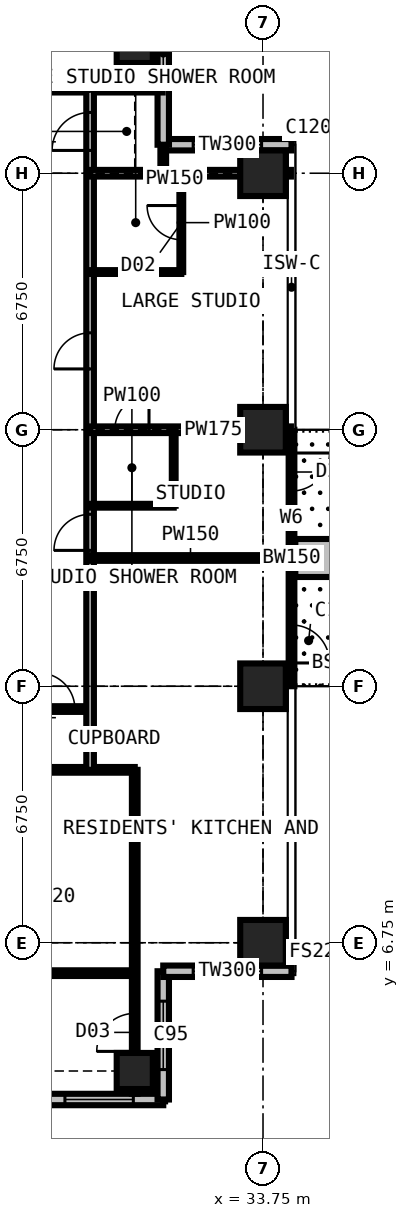
"""IFC4 building model, lengths in metres.
Left out: names, types, materials, properties, quantities, classifications, styles, units other than length and angle.
Written with IfcOpenShell. Run it as: python <this file> out.ifc"""

import sys

from ifc_helpers import new_model, si_unit, direction, frame, frame_2d, origin, origin_2d, place, context, subcontext, project, spatial, rectangle, extrude, element, fill, save


model = new_model("IFC4")
c1 = context("Model", 3, precision=1e-05, world=origin(), true_north=direction((0.0, 1.0)))
c2 = subcontext(c1, "Body", "Model", "MODEL_VIEW")
j1 = project(units=[si_unit("LENGTHUNIT", "METRE"), si_unit("PLANEANGLEUNIT", "RADIAN")], contexts=[c1])
p1 = place(None, origin())
s1 = spatial("IfcSite", under=j1, at=p1, CompositionType="ELEMENT")
p2 = place(p1, origin())
s2 = spatial("IfcBuilding", under=s1, at=p2, CompositionType="ELEMENT")
p3 = place(p2, frame((0.0, 0.0, 178.2)))
s3 = spatial("IfcBuildingStorey", under=s2, at=p3, CompositionType="ELEMENT", Elevation=178.2)
for number, where, z_axis, x_axis in (
    (1, (30.375, 3.375, 0.0), (0.0, 0.0, 1.0), (1.0, 0.0, 0.0)),
    (2, (30.375, 30.375, 0.0), (0.0, 0.0, 1.0), (1.0, 0.0, 0.0)),
):
    element("IfcColumn", number, at=place(p3, frame(where, z_axis=z_axis, x_axis=x_axis)), inside=s3, PredefinedType="COLUMN", context=c2, shape_type="SweptSolid", body=[
        extrude(rectangle(XDim=0.95, YDim=0.95, at=origin_2d()), origin(), (0.0, 0.0, 1.0), 3.6),
    ])
for number, where, z_axis, x_axis in (
    (3, (33.75, 6.75, 0.0), (0.0, 0.0, 1.0), (1.0, 0.0, 0.0)),
    (4, (33.75, 13.5, 0.0), (0.0, 0.0, 1.0), (1.0, 0.0, 0.0)),
    (5, (33.75, 20.25, 0.0), (0.0, 0.0, 1.0), (1.0, 0.0, 0.0)),
    (6, (33.75, 27.0, 0.0), (0.0, 0.0, 1.0), (1.0, 0.0, 0.0)),
):
    element("IfcColumn", number, at=place(p3, frame(where, z_axis=z_axis, x_axis=x_axis)), inside=s3, PredefinedType="COLUMN", context=c2, shape_type="SweptSolid", body=[
        extrude(rectangle(XDim=1.2, YDim=1.2, at=origin_2d()), origin(), (0.0, 0.0, 1.0), 3.6),
    ])
p4 = place(p3, frame((34.5, 20.25, 0.0), z_axis=(0.0, 0.0, 1.0), x_axis=(0.0, -1.0, 0.0)))
e7 = element("IfcWall", 7, at=p4, inside=s3, PredefinedType="SOLIDWALL", context=c2, shape_type="SweptSolid", body=[
    extrude(rectangle(XDim=6.75, YDim=0.15, at=frame_2d((3.375, 0.0))), origin(), (0.0, 0.0, 1.0), 3.375),
])
p5 = place(p4, frame((0.613, 0.0, 0.0)))
e8 = element("IfcOpeningElement", 8, at=p5, cuts=e7, PredefinedType="OPENING", context=c2, shape_type="SweptSolid", body=[
    extrude(rectangle(XDim=1.0, YDim=2.2, at=frame_2d((0.5, 1.1))), frame((0.0, 0.085, 0.0), z_axis=(0.0, -1.0, 0.0), x_axis=(1.0, 0.0, 0.0)), (0.0, 0.0, 1.0), 0.17),
])
p6 = place(p4, frame((1.725, 0.0, 0.9)))
e9 = element("IfcOpeningElement", 9, at=p6, cuts=e7, PredefinedType="OPENING", context=c2, shape_type="SweptSolid", body=[
    extrude(rectangle(XDim=1.2, YDim=1.8, at=frame_2d((0.6, 0.9))), frame((0.0, 0.085, 0.0), z_axis=(0.0, -1.0, 0.0), x_axis=(1.0, 0.0, 0.0)), (0.0, 0.0, 1.0), 0.17),
])
p7 = place(p4, frame((5.137, 0.0, 0.0)))
e10 = element("IfcOpeningElement", 10, at=p7, cuts=e7, PredefinedType="OPENING", context=c2, shape_type="SweptSolid", body=[
    extrude(rectangle(XDim=1.0, YDim=2.2, at=frame_2d((0.5, 1.1))), frame((0.0, 0.085, 0.0), z_axis=(0.0, -1.0, 0.0), x_axis=(1.0, 0.0, 0.0)), (0.0, 0.0, 1.0), 0.17),
])
p8 = place(p4, frame((3.825, 0.0, 0.9)))
e11 = element("IfcOpeningElement", 11, at=p8, cuts=e7, PredefinedType="OPENING", context=c2, shape_type="SweptSolid", body=[
    extrude(rectangle(XDim=1.2, YDim=1.8, at=frame_2d((0.6, 0.9))), frame((0.0, 0.085, 0.0), z_axis=(0.0, -1.0, 0.0), x_axis=(1.0, 0.0, 0.0)), (0.0, 0.0, 1.0), 0.17),
])
p9 = place(p3, frame((34.5, 27.75, 0.0), z_axis=(0.0, 0.0, 1.0), x_axis=(-1.0, 0.0, 0.0)))
e12 = element("IfcWall", 12, at=p9, inside=s3, PredefinedType="SOLIDWALL", context=c2, shape_type="SweptSolid", body=[
    extrude(rectangle(XDim=3.375, YDim=0.3, at=frame_2d((1.688, 0.0))), origin(), (0.0, 0.0, 1.0), 3.375),
])
p10 = place(p9, frame((0.788, 0.0, 0.6)))
e13 = element("IfcOpeningElement", 13, at=p10, cuts=e12, PredefinedType="OPENING", context=c2, shape_type="SweptSolid", body=[
    extrude(rectangle(XDim=1.8, YDim=2.1, at=frame_2d((0.9, 1.05))), frame((0.0, 0.16, 0.0), z_axis=(0.0, -1.0, 0.0), x_axis=(1.0, 0.0, 0.0)), (0.0, 0.0, 1.0), 0.32),
])
p11 = place(p3, frame((31.125, 27.75, 0.0), z_axis=(0.0, 0.0, 1.0), x_axis=(0.0, 1.0, 0.0)))
e14 = element("IfcWall", 14, at=p11, inside=s3, PredefinedType="SOLIDWALL", context=c2, shape_type="SweptSolid", body=[
    extrude(rectangle(XDim=3.375, YDim=0.3, at=frame_2d((1.688, 0.0))), origin(), (0.0, 0.0, 1.0), 3.375),
])
p12 = place(p11, frame((1.663, 0.0, 0.9)))
e15 = element("IfcOpeningElement", 15, at=p12, cuts=e14, PredefinedType="OPENING", context=c2, shape_type="SweptSolid", body=[
    extrude(rectangle(XDim=1.5, YDim=1.8, at=frame_2d((0.75, 0.9))), frame((0.0, 0.16, 0.0), z_axis=(0.0, -1.0, 0.0), x_axis=(1.0, 0.0, 0.0)), (0.0, 0.0, 1.0), 0.32),
])
p13 = place(p3, frame((27.75, 2.625, 0.0), z_axis=(0.0, 0.0, 1.0), x_axis=(1.0, 0.0, 0.0)))
e16 = element("IfcWall", 16, at=p13, inside=s3, PredefinedType="SOLIDWALL", context=c2, shape_type="SweptSolid", body=[
    extrude(rectangle(XDim=3.375, YDim=0.3, at=frame_2d((1.688, 0.0))), origin(), (0.0, 0.0, 1.0), 3.375),
])
p14 = place(p13, frame((0.788, 0.0, 0.6)))
e17 = element("IfcOpeningElement", 17, at=p14, cuts=e16, PredefinedType="OPENING", context=c2, shape_type="SweptSolid", body=[
    extrude(rectangle(XDim=1.8, YDim=2.1, at=frame_2d((0.9, 1.05))), frame((0.0, 0.16, 0.0), z_axis=(0.0, -1.0, 0.0), x_axis=(1.0, 0.0, 0.0)), (0.0, 0.0, 1.0), 0.32),
])
p15 = place(p3, frame((31.125, 2.625, 0.0), z_axis=(0.0, 0.0, 1.0), x_axis=(0.0, 1.0, 0.0)))
e18 = element("IfcWall", 18, at=p15, inside=s3, PredefinedType="SOLIDWALL", context=c2, shape_type="SweptSolid", body=[
    extrude(rectangle(XDim=3.375, YDim=0.3, at=frame_2d((1.688, 0.0))), origin(), (0.0, 0.0, 1.0), 3.375),
])
p16 = place(p15, frame((0.788, 0.0, 0.6)))
e19 = element("IfcOpeningElement", 19, at=p16, cuts=e18, PredefinedType="OPENING", context=c2, shape_type="SweptSolid", body=[
    extrude(rectangle(XDim=1.8, YDim=2.1, at=frame_2d((0.9, 1.05))), frame((0.0, 0.16, 0.0), z_axis=(0.0, -1.0, 0.0), x_axis=(1.0, 0.0, 0.0)), (0.0, 0.0, 1.0), 0.32),
])
p17 = place(p3, frame((31.125, 6.0, 0.0), z_axis=(0.0, 0.0, 1.0), x_axis=(1.0, 0.0, 0.0)))
e20 = element("IfcWall", 20, at=p17, inside=s3, PredefinedType="SOLIDWALL", context=c2, shape_type="SweptSolid", body=[
    extrude(rectangle(XDim=3.375, YDim=0.3, at=frame_2d((1.688, 0.0))), origin(), (0.0, 0.0, 1.0), 3.375),
])
p18 = place(p17, frame((0.788, 0.0, 0.6)))
e21 = element("IfcOpeningElement", 21, at=p18, cuts=e20, PredefinedType="OPENING", context=c2, shape_type="SweptSolid", body=[
    extrude(rectangle(XDim=1.8, YDim=2.1, at=frame_2d((0.9, 1.05))), frame((0.0, 0.16, 0.0), z_axis=(0.0, -1.0, 0.0), x_axis=(1.0, 0.0, 0.0)), (0.0, 0.0, 1.0), 0.32),
])
p19 = place(p3, frame((34.6, 16.875, 0.0), z_axis=(0.0, 0.0, 1.0), x_axis=(1.0, 0.0, 0.0)))
e22 = element("IfcWall", 22, at=p19, inside=s3, PredefinedType="USERDEFINED", context=c2, shape_type="SweptSolid", body=[
    extrude(rectangle(XDim=2.2, YDim=1.0, at=frame_2d((1.1, 0.0))), origin(), (0.0, 0.0, 1.0), 0.9),
])
p20 = place(p3, frame((10.125, 11.3, 0.0), z_axis=(0.0, 0.0, 1.0), x_axis=(1.0, 0.0, 0.0)))
e23 = element("IfcWall", 23, at=p20, inside=s3, PredefinedType="PARTITIONING", context=c2, shape_type="SweptSolid", body=[
    extrude(rectangle(XDim=20.25, YDim=0.15, at=frame_2d((10.125, 0.0))), origin(), (0.0, 0.0, 1.0), 3.375),
])
p21 = place(p20, frame((5.2, 0.0, 0.0)))
e24 = element("IfcOpeningElement", 24, at=p21, cuts=e23, PredefinedType="OPENING", context=c2, shape_type="SweptSolid", body=[
    extrude(rectangle(XDim=1.0, YDim=2.2, at=frame_2d((0.5, 1.1))), frame((0.0, 0.085, 0.0), z_axis=(0.0, -1.0, 0.0), x_axis=(1.0, 0.0, 0.0)), (0.0, 0.0, 1.0), 0.17),
])
p22 = place(p20, frame((11.312, 0.0, 0.0)))
e25 = element("IfcOpeningElement", 25, at=p22, cuts=e23, PredefinedType="OPENING", context=c2, shape_type="SweptSolid", body=[
    extrude(rectangle(XDim=1.0, YDim=2.2, at=frame_2d((0.5, 1.1))), frame((0.0, 0.085, 0.0), z_axis=(0.0, -1.0, 0.0), x_axis=(1.0, 0.0, 0.0)), (0.0, 0.0, 1.0), 0.17),
])
p23 = place(p20, frame((2.425, 0.0, 0.0)))
e26 = element("IfcOpeningElement", 26, at=p23, cuts=e23, PredefinedType="OPENING", context=c2, shape_type="SweptSolid", body=[
    extrude(rectangle(XDim=0.95, YDim=2.2, at=frame_2d((0.475, 1.1))), frame((0.0, 0.085, 0.0), z_axis=(0.0, -1.0, 0.0), x_axis=(1.0, 0.0, 0.0)), (0.0, 0.0, 1.0), 0.17),
])
p24 = place(p3, frame((11.3, 29.2, 0.0), z_axis=(0.0, 0.0, 1.0), x_axis=(1.0, 0.0, 0.0)))
e27 = element("IfcWall", 27, at=p24, inside=s3, PredefinedType="PARTITIONING", context=c2, shape_type="SweptSolid", body=[
    extrude(rectangle(XDim=19.809, YDim=0.15, at=frame_2d((9.904, 0.0))), origin(), (0.0, 0.0, 1.0), 3.375),
])
p25 = place(p24, frame((12.9, 0.0, 0.0)))
e28 = element("IfcOpeningElement", 28, at=p25, cuts=e27, PredefinedType="OPENING", context=c2, shape_type="SweptSolid", body=[
    extrude(rectangle(XDim=1.0, YDim=2.2, at=frame_2d((0.5, 1.1))), frame((0.0, 0.085, 0.0), z_axis=(0.0, -1.0, 0.0), x_axis=(1.0, 0.0, 0.0)), (0.0, 0.0, 1.0), 0.17),
])
p26 = place(p24, frame((5.825, 0.0, 0.0)))
e29 = element("IfcOpeningElement", 29, at=p26, cuts=e27, PredefinedType="OPENING", context=c2, shape_type="SweptSolid", body=[
    extrude(rectangle(XDim=0.95, YDim=2.2, at=frame_2d((0.475, 1.1))), frame((0.0, 0.085, 0.0), z_axis=(0.0, -1.0, 0.0), x_axis=(1.0, 0.0, 0.0)), (0.0, 0.0, 1.0), 0.17),
])
p27 = place(p24, frame((0.6, 0.0, 0.0)))
e30 = element("IfcOpeningElement", 30, at=p27, cuts=e27, PredefinedType="OPENING", context=c2, shape_type="SweptSolid", body=[
    extrude(rectangle(XDim=1.0, YDim=2.2, at=frame_2d((0.5, 1.1))), frame((0.0, 0.085, 0.0), z_axis=(0.0, -1.0, 0.0), x_axis=(1.0, 0.0, 0.0)), (0.0, 0.0, 1.0), 0.17),
])
p28 = place(p3, frame((27.4, 12.9, 0.0), z_axis=(0.0, 0.0, 1.0), x_axis=(1.0, 0.0, 0.0)))
e31 = element("IfcWall", 31, at=p28, inside=s3, PredefinedType="PARTITIONING", context=c2, shape_type="SweptSolid", body=[
    extrude(rectangle(XDim=1.8, YDim=0.15, at=frame_2d((0.9, 0.0))), origin(), (0.0, 0.0, 1.0), 2.806),
])
p29 = place(p28, frame((0.45, 0.0, 0.0)))
e32 = element("IfcOpeningElement", 32, at=p29, cuts=e31, PredefinedType="OPENING", context=c2, shape_type="SweptSolid", body=[
    extrude(rectangle(XDim=0.95, YDim=2.2, at=frame_2d((0.475, 1.1))), frame((0.0, 0.085, 0.0), z_axis=(0.0, -1.0, 0.0), x_axis=(1.0, 0.0, 0.0)), (0.0, 0.0, 1.0), 0.17),
])
p30 = place(p3, frame((27.725, 5.95, 0.0), z_axis=(0.0, 0.0, 1.0), x_axis=(1.0, 0.0, 0.0)))
e33 = element("IfcWall", 33, at=p30, inside=s3, PredefinedType="PARTITIONING", context=c2, shape_type="SweptSolid", body=[
    extrude(rectangle(XDim=2.65, YDim=0.15, at=frame_2d((1.325, 0.0))), origin(), (0.0, 0.0, 1.0), 3.375),
])
p31 = place(p3, frame((29.2, 11.3, 0.0), z_axis=(0.0, 0.0, 1.0), x_axis=(0.0, 1.0, 0.0)))
e34 = element("IfcWall", 34, at=p31, inside=s3, PredefinedType="PARTITIONING", context=c2, shape_type="SweptSolid", body=[
    extrude(rectangle(XDim=17.9, YDim=0.2, at=frame_2d((8.95, 0.0))), origin(), (0.0, 0.0, 1.0), 3.375),
])
p32 = place(p31, frame((10.55, 0.0, 0.0)))
e35 = element("IfcOpeningElement", 35, at=p32, cuts=e34, PredefinedType="OPENING", context=c2, shape_type="SweptSolid", body=[
    extrude(rectangle(XDim=0.95, YDim=2.2, at=frame_2d((0.475, 1.1))), frame((0.0, 0.11, 0.0), z_axis=(0.0, -1.0, 0.0), x_axis=(1.0, 0.0, 0.0)), (0.0, 0.0, 1.0), 0.22),
])
p33 = place(p31, frame((5.775, 0.0, 0.0)))
e36 = element("IfcOpeningElement", 36, at=p33, cuts=e34, PredefinedType="OPENING", context=c2, shape_type="SweptSolid", body=[
    extrude(rectangle(XDim=0.95, YDim=2.2, at=frame_2d((0.475, 1.1))), frame((0.0, 0.11, 0.0), z_axis=(0.0, -1.0, 0.0), x_axis=(1.0, 0.0, 0.0)), (0.0, 0.0, 1.0), 0.22),
])
p34 = place(p31, frame((16.3, 0.0, 0.0)))
e37 = element("IfcOpeningElement", 37, at=p34, cuts=e34, PredefinedType="OPENING", context=c2, shape_type="SweptSolid", body=[
    extrude(rectangle(XDim=1.0, YDim=2.2, at=frame_2d((0.5, 1.1))), frame((0.0, 0.11, 0.0), z_axis=(0.0, -1.0, 0.0), x_axis=(1.0, 0.0, 0.0)), (0.0, 0.0, 1.0), 0.22),
])
p35 = place(p3, frame((29.2, 16.875, 0.0), z_axis=(0.0, 0.0, 1.0), x_axis=(1.0, 0.0, 0.0)))
e38 = element("IfcWall", 38, at=p35, inside=s3, PredefinedType="PARTITIONING", context=c2, shape_type="SweptSolid", body=[
    extrude(rectangle(XDim=5.284, YDim=0.15, at=frame_2d((2.642, 0.0))), origin(), (0.0, 0.0, 1.0), 3.375),
])
p36 = place(p3, frame((29.2, 18.25, 0.0), z_axis=(0.0, 0.0, 1.0), x_axis=(1.0, 0.0, 0.0)))
e39 = element("IfcWall", 39, at=p36, inside=s3, PredefinedType="PARTITIONING", context=c2, shape_type="SweptSolid", body=[
    extrude(rectangle(XDim=2.2, YDim=0.1, at=frame_2d((1.1, 0.0))), origin(), (0.0, 0.0, 1.0), 3.375),
])
p37 = place(p3, frame((29.2, 20.25, 0.0), z_axis=(0.0, 0.0, 1.0), x_axis=(1.0, 0.0, 0.0)))
e40 = element("IfcWall", 40, at=p37, inside=s3, PredefinedType="PARTITIONING", context=c2, shape_type="SweptSolid", body=[
    extrude(rectangle(XDim=5.284, YDim=0.175, at=frame_2d((2.642, 0.0))), origin(), (0.0, 0.0, 1.0), 2.806),
])
p38 = place(p37, frame((0.65, 0.0, 0.0)))
e41 = element("IfcOpeningElement", 41, at=p38, cuts=e40, PredefinedType="OPENING", context=c2, shape_type="SweptSolid", body=[
    extrude(rectangle(XDim=0.9, YDim=2.2, at=frame_2d((0.45, 1.1))), frame((0.0, 0.097, 0.0), z_axis=(0.0, -1.0, 0.0), x_axis=(1.0, 0.0, 0.0)), (0.0, 0.0, 1.0), 0.195),
])
p39 = place(p3, frame((29.2, 24.4, 0.0), z_axis=(0.0, 0.0, 1.0), x_axis=(1.0, 0.0, 0.0)))
e42 = element("IfcWall", 42, at=p39, inside=s3, PredefinedType="PARTITIONING", context=c2, shape_type="SweptSolid", body=[
    extrude(rectangle(XDim=2.4, YDim=0.1, at=frame_2d((1.2, 0.0))), origin(), (0.0, 0.0, 1.0), 3.375),
])
p40 = place(p3, frame((29.2, 27.0, 0.0), z_axis=(0.0, 0.0, 1.0), x_axis=(1.0, 0.0, 0.0)))
e43 = element("IfcWall", 43, at=p40, inside=s3, PredefinedType="PARTITIONING", context=c2, shape_type="SweptSolid", body=[
    extrude(rectangle(XDim=5.284, YDim=0.175, at=frame_2d((2.642, 0.0))), origin(), (0.0, 0.0, 1.0), 2.806),
])
p41 = place(p3, frame((30.375, 2.775, 0.0), z_axis=(0.0, 0.0, 1.0), x_axis=(0.0, 1.0, 0.0)))
e44 = element("IfcWall", 44, at=p41, inside=s3, PredefinedType="PARTITIONING", context=c2, shape_type="SweptSolid", body=[
    extrude(rectangle(XDim=8.525, YDim=0.15, at=frame_2d((4.263, 0.0))), origin(), (0.0, 0.0, 1.0), 2.877),
])
p42 = place(p41, frame((1.116, 0.0, 0.0)))
e45 = element("IfcOpeningElement", 45, at=p42, cuts=e44, PredefinedType="OPENING", context=c2, shape_type="SweptSolid", body=[
    extrude(rectangle(XDim=1.0, YDim=2.2, at=frame_2d((0.5, 1.1))), frame((0.0, 0.085, 0.0), z_axis=(0.0, -1.0, 0.0), x_axis=(1.0, 0.0, 0.0)), (0.0, 0.0, 1.0), 0.17),
])
p43 = place(p3, frame((31.125, 27.0, 0.0), z_axis=(0.0, 0.0, 1.0), x_axis=(0.0, 1.0, 0.0)))
e46 = element("IfcWall", 46, at=p43, inside=s3, PredefinedType="PARTITIONING", context=c2, shape_type="SweptSolid", body=[
    extrude(rectangle(XDim=0.734, YDim=0.15, at=frame_2d((0.367, 0.0))), origin(), (0.0, 0.0, 1.0), 3.375),
])
p44 = place(p3, frame((31.4, 18.25, 0.0), z_axis=(0.0, 0.0, 1.0), x_axis=(0.0, 1.0, 0.0)))
e47 = element("IfcWall", 47, at=p44, inside=s3, PredefinedType="PARTITIONING", context=c2, shape_type="SweptSolid", body=[
    extrude(rectangle(XDim=2.0, YDim=0.1, at=frame_2d((1.0, 0.0))), origin(), (0.0, 0.0, 1.0), 3.375),
])
p45 = place(p3, frame((31.6, 24.4, 0.0), z_axis=(0.0, 0.0, 1.0), x_axis=(0.0, 1.0, 0.0)))
e48 = element("IfcWall", 48, at=p45, inside=s3, PredefinedType="PARTITIONING", context=c2, shape_type="SweptSolid", body=[
    extrude(rectangle(XDim=2.6, YDim=0.1, at=frame_2d((1.3, 0.0))), origin(), (0.0, 0.0, 1.0), 3.375),
])
p46 = place(p45, frame((0.85, 0.0, 0.0)))
e49 = element("IfcOpeningElement", 49, at=p46, cuts=e48, PredefinedType="OPENING", context=c2, shape_type="SweptSolid", body=[
    extrude(rectangle(XDim=0.9, YDim=2.2, at=frame_2d((0.45, 1.1))), frame((0.0, 0.06, 0.0), z_axis=(0.0, -1.0, 0.0), x_axis=(1.0, 0.0, 0.0)), (0.0, 0.0, 1.0), 0.12),
])
p47 = place(p5, origin())
e50 = element("IfcDoor", 50, at=p47, inside=s3, OperationType="SINGLE_SWING_LEFT", PredefinedType="DOOR", context=c2, shape_type="SweptSolid", body=[
    extrude(rectangle(XDim=1.0, YDim=2.2, at=frame_2d((0.5, 1.1))), frame((0.0, 0.025, 0.0), z_axis=(0.0, -1.0, 0.0), x_axis=(1.0, 0.0, 0.0)), (0.0, 0.0, 1.0), 0.05),
])
fill(e8, e50)
p48 = place(p6, origin())
e51 = element("IfcWindow", 51, at=p48, inside=s3, PartitioningType="SINGLE_PANEL", PredefinedType="WINDOW", context=c2, shape_type="SweptSolid", body=[
    extrude(rectangle(XDim=1.2, YDim=1.8, at=frame_2d((0.6, 0.9))), frame((0.0, 0.03, 0.0), z_axis=(0.0, -1.0, 0.0), x_axis=(1.0, 0.0, 0.0)), (0.0, 0.0, 1.0), 0.06),
])
fill(e9, e51)
p49 = place(p7, origin())
e52 = element("IfcDoor", 52, at=p49, inside=s3, OperationType="SINGLE_SWING_RIGHT", PredefinedType="DOOR", context=c2, shape_type="SweptSolid", body=[
    extrude(rectangle(XDim=1.0, YDim=2.2, at=frame_2d((0.5, 1.1))), frame((0.0, 0.025, 0.0), z_axis=(0.0, -1.0, 0.0), x_axis=(1.0, 0.0, 0.0)), (0.0, 0.0, 1.0), 0.05),
])
fill(e10, e52)
p50 = place(p8, origin())
e53 = element("IfcWindow", 53, at=p50, inside=s3, PartitioningType="SINGLE_PANEL", PredefinedType="WINDOW", context=c2, shape_type="SweptSolid", body=[
    extrude(rectangle(XDim=1.2, YDim=1.8, at=frame_2d((0.6, 0.9))), frame((0.0, 0.03, 0.0), z_axis=(0.0, -1.0, 0.0), x_axis=(1.0, 0.0, 0.0)), (0.0, 0.0, 1.0), 0.06),
])
fill(e11, e53)
p51 = place(p10, origin())
e54 = element("IfcWindow", 54, at=p51, inside=s3, PartitioningType="SINGLE_PANEL", PredefinedType="WINDOW", context=c2, shape_type="SweptSolid", body=[
    extrude(rectangle(XDim=1.8, YDim=2.1, at=frame_2d((0.9, 1.05))), frame((0.0, 0.03, 0.0), z_axis=(0.0, -1.0, 0.0), x_axis=(1.0, 0.0, 0.0)), (0.0, 0.0, 1.0), 0.06),
])
fill(e13, e54)
p52 = place(p12, origin())
e55 = element("IfcWindow", 55, at=p52, inside=s3, PartitioningType="SINGLE_PANEL", PredefinedType="WINDOW", context=c2, shape_type="SweptSolid", body=[
    extrude(rectangle(XDim=1.5, YDim=1.8, at=frame_2d((0.75, 0.9))), frame((0.0, 0.03, 0.0), z_axis=(0.0, -1.0, 0.0), x_axis=(1.0, 0.0, 0.0)), (0.0, 0.0, 1.0), 0.06),
])
fill(e15, e55)
p53 = place(p14, origin())
e56 = element("IfcWindow", 56, at=p53, inside=s3, PartitioningType="SINGLE_PANEL", PredefinedType="WINDOW", context=c2, shape_type="SweptSolid", body=[
    extrude(rectangle(XDim=1.8, YDim=2.1, at=frame_2d((0.9, 1.05))), frame((0.0, 0.03, 0.0), z_axis=(0.0, -1.0, 0.0), x_axis=(1.0, 0.0, 0.0)), (0.0, 0.0, 1.0), 0.06),
])
fill(e17, e56)
p54 = place(p16, origin())
e57 = element("IfcWindow", 57, at=p54, inside=s3, PartitioningType="SINGLE_PANEL", PredefinedType="WINDOW", context=c2, shape_type="SweptSolid", body=[
    extrude(rectangle(XDim=1.8, YDim=2.1, at=frame_2d((0.9, 1.05))), frame((0.0, 0.03, 0.0), z_axis=(0.0, -1.0, 0.0), x_axis=(1.0, 0.0, 0.0)), (0.0, 0.0, 1.0), 0.06),
])
fill(e19, e57)
p55 = place(p18, origin())
e58 = element("IfcWindow", 58, at=p55, inside=s3, PartitioningType="SINGLE_PANEL", PredefinedType="WINDOW", context=c2, shape_type="SweptSolid", body=[
    extrude(rectangle(XDim=1.8, YDim=2.1, at=frame_2d((0.9, 1.05))), frame((0.0, 0.03, 0.0), z_axis=(0.0, -1.0, 0.0), x_axis=(1.0, 0.0, 0.0)), (0.0, 0.0, 1.0), 0.06),
])
fill(e21, e58)
p56 = place(p29, origin())
e59 = element("IfcDoor", 59, at=p56, inside=s3, OperationType="SINGLE_SWING_LEFT", PredefinedType="DOOR", context=c2, shape_type="SweptSolid", body=[
    extrude(rectangle(XDim=0.95, YDim=2.2, at=frame_2d((0.475, 1.1))), frame((0.0, 0.025, 0.0), z_axis=(0.0, -1.0, 0.0), x_axis=(1.0, 0.0, 0.0)), (0.0, 0.0, 1.0), 0.05),
])
fill(e32, e59)
p57 = place(p42, origin())
e60 = element("IfcDoor", 60, at=p57, inside=s3, OperationType="SINGLE_SWING_LEFT", PredefinedType="DOOR", context=c2, shape_type="SweptSolid", body=[
    extrude(rectangle(XDim=1.0, YDim=2.2, at=frame_2d((0.5, 1.1))), frame((0.0, 0.025, 0.0), z_axis=(0.0, -1.0, 0.0), x_axis=(1.0, 0.0, 0.0)), (0.0, 0.0, 1.0), 0.05),
])
fill(e45, e60)
p58 = place(p32, origin())
e61 = element("IfcDoor", 61, at=p58, inside=s3, OperationType="SINGLE_SWING_LEFT", PredefinedType="DOOR", context=c2, shape_type="SweptSolid", body=[
    extrude(rectangle(XDim=0.95, YDim=2.2, at=frame_2d((0.475, 1.1))), frame((0.0, 0.025, 0.0), z_axis=(0.0, -1.0, 0.0), x_axis=(1.0, 0.0, 0.0)), (0.0, 0.0, 1.0), 0.05),
])
fill(e35, e61)
p59 = place(p46, origin())
e62 = element("IfcDoor", 62, at=p59, inside=s3, OperationType="SINGLE_SWING_RIGHT", PredefinedType="DOOR", context=c2, shape_type="SweptSolid", body=[
    extrude(rectangle(XDim=0.9, YDim=2.2, at=frame_2d((0.45, 1.1))), frame((0.0, 0.025, 0.0), z_axis=(0.0, -1.0, 0.0), x_axis=(1.0, 0.0, 0.0)), (0.0, 0.0, 1.0), 0.05),
])
fill(e49, e62)
p60 = place(p33, origin())
e63 = element("IfcDoor", 63, at=p60, inside=s3, OperationType="SINGLE_SWING_LEFT", PredefinedType="DOOR", context=c2, shape_type="SweptSolid", body=[
    extrude(rectangle(XDim=0.95, YDim=2.2, at=frame_2d((0.475, 1.1))), frame((0.0, 0.025, 0.0), z_axis=(0.0, -1.0, 0.0), x_axis=(1.0, 0.0, 0.0)), (0.0, 0.0, 1.0), 0.05),
])
fill(e36, e63)
p61 = place(p38, origin())
e64 = element("IfcDoor", 64, at=p61, inside=s3, OperationType="SINGLE_SWING_RIGHT", PredefinedType="DOOR", context=c2, shape_type="SweptSolid", body=[
    extrude(rectangle(XDim=0.9, YDim=2.2, at=frame_2d((0.45, 1.1))), frame((0.0, 0.025, 0.0), z_axis=(0.0, -1.0, 0.0), x_axis=(1.0, 0.0, 0.0)), (0.0, 0.0, 1.0), 0.05),
])
fill(e41, e64)
p62 = place(p34, origin())
e65 = element("IfcDoor", 65, at=p62, inside=s3, OperationType="SINGLE_SWING_LEFT", PredefinedType="DOOR", context=c2, shape_type="SweptSolid", body=[
    extrude(rectangle(XDim=1.0, YDim=2.2, at=frame_2d((0.5, 1.1))), frame((0.0, 0.025, 0.0), z_axis=(0.0, -1.0, 0.0), x_axis=(1.0, 0.0, 0.0)), (0.0, 0.0, 1.0), 0.05),
])
fill(e37, e65)
save(model, sys.argv[1])
